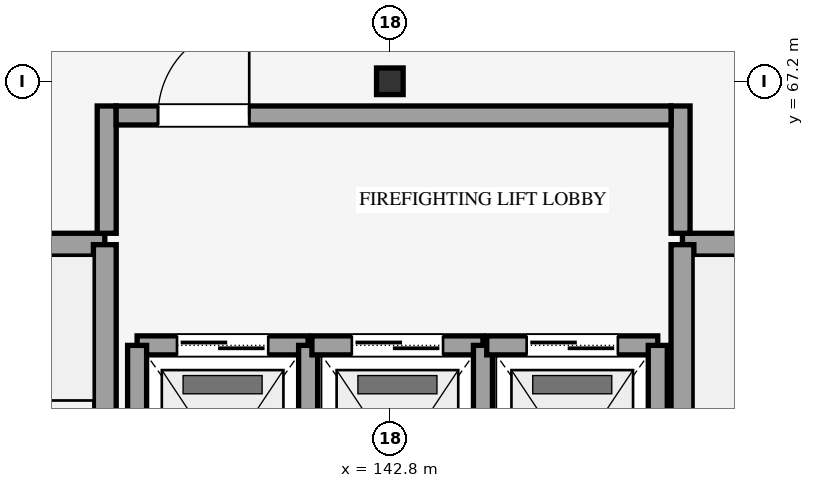
"""IFC4 building model, lengths in metres.
Left out: names, types, materials, properties, quantities, classifications, styles, units other than length and angle.
Written with IfcOpenShell. Run it as: python <this file> out.ifc"""

import sys

from ifc_helpers import new_model, si_unit, direction, frame, frame_2d, origin, origin_2d, place, context, subcontext, project, spatial, rectangle, i_section, extrude, element, fill, save


model = new_model("IFC4")
c1 = context("Model", 3, precision=1e-05, world=origin(), true_north=direction((0.0, 1.0)))
c2 = subcontext(c1, "Body", "Model", "MODEL_VIEW")
j1 = project(units=[si_unit("LENGTHUNIT", "METRE"), si_unit("PLANEANGLEUNIT", "RADIAN")], contexts=[c1])
p1 = place(None, origin())
s1 = spatial("IfcSite", under=j1, at=p1, CompositionType="ELEMENT")
p2 = place(p1, origin())
s2 = spatial("IfcBuilding", under=s1, at=p2, CompositionType="ELEMENT")
p3 = place(p2, frame((0.0, 0.0, 53.1)))
s3 = spatial("IfcBuildingStorey", under=s2, at=p3, CompositionType="ELEMENT", Elevation=53.1)
p4 = place(p3, frame((142.8, 67.2, 0.0), z_axis=(0.0, 0.0, 1.0), x_axis=(1.0, 0.0, 0.0)))
e1 = element("IfcColumn", 1, at=p4, inside=s3, PredefinedType="COLUMN", context=c2, shape_type="SweptSolid", body=[
    extrude(i_section(OverallWidth=0.35, OverallDepth=0.35, WebThickness=0.012, FlangeThickness=0.019, FilletRadius=0.02, at=origin_2d()), origin(), (0.0, 0.0, 1.0), 4.2),
])
p5 = place(p3, frame((135.05, 65.05, 0.0), z_axis=(0.0, 0.0, 1.0), x_axis=(1.0, 0.0, 0.0)))
e2 = element("IfcWall", 2, at=p5, inside=s3, PredefinedType="SHEAR", context=c2, shape_type="SweptSolid", body=[
    extrude(rectangle(XDim=4.0, YDim=0.3, at=frame_2d((2.0, 0.0))), origin(), (0.0, 0.0, 1.0), 4.2),
])
p6 = place(p3, frame((139.05, 50.75, 0.0), z_axis=(0.0, 0.0, 1.0), x_axis=(0.0, 1.0, 0.0)))
e3 = element("IfcWall", 3, at=p6, inside=s3, PredefinedType="SHEAR", context=c2, shape_type="SweptSolid", body=[
    extrude(rectangle(XDim=14.3, YDim=0.3, at=frame_2d((7.15, 0.0))), origin(), (0.0, 0.0, 1.0), 4.2),
])
p7 = place(p3, frame((146.65, 65.05, 0.0), z_axis=(0.0, 0.0, 1.0), x_axis=(1.0, 0.0, 0.0)))
e4 = element("IfcWall", 4, at=p7, inside=s3, PredefinedType="SHEAR", context=c2, shape_type="SweptSolid", body=[
    extrude(rectangle(XDim=4.0, YDim=0.3, at=frame_2d((2.0, 0.0))), origin(), (0.0, 0.0, 1.0), 4.2),
])
p8 = place(p3, frame((146.65, 50.75, 0.0), z_axis=(0.0, 0.0, 1.0), x_axis=(0.0, 1.0, 0.0)))
e5 = element("IfcWall", 5, at=p8, inside=s3, PredefinedType="SHEAR", context=c2, shape_type="SweptSolid", body=[
    extrude(rectangle(XDim=14.3, YDim=0.3, at=frame_2d((7.15, 0.0))), origin(), (0.0, 0.0, 1.0), 4.2),
])
p9 = place(p3, frame((139.475, 63.725, 0.0), z_axis=(0.0, 0.0, 1.0), x_axis=(1.0, 0.0, 0.0)))
e6 = element("IfcWall", 6, at=p9, inside=s3, PredefinedType="SHEAR", context=c2, shape_type="SweptSolid", body=[
    extrude(rectangle(XDim=2.25, YDim=0.25, at=frame_2d((1.125, 0.0))), origin(), (0.0, 0.0, 1.0), 3.96),
])
p10 = place(p9, frame((0.525, 0.0, 0.0)))
e7 = element("IfcOpeningElement", 7, at=p10, cuts=e6, PredefinedType="OPENING", context=c2, shape_type="SweptSolid", body=[
    extrude(rectangle(XDim=1.2, YDim=2.18, at=frame_2d((0.6, 1.09))), frame((0.0, 0.135, 0.0), z_axis=(0.0, -1.0, 0.0), x_axis=(1.0, 0.0, 0.0)), (0.0, 0.0, 1.0), 0.27),
])
for number, where, z_axis, x_axis in (
    (8, (139.475, 60.675, 0.0), (0.0, 0.0, 1.0), (0.0, 1.0, 0.0)),
    (9, (141.725, 60.675, 0.0), (0.0, 0.0, 1.0), (0.0, 1.0, 0.0)),
):
    element("IfcWall", number, at=place(p3, frame(where, z_axis=z_axis, x_axis=x_axis)), inside=s3, PredefinedType="SHEAR", context=c2, shape_type="SweptSolid", body=[
        extrude(rectangle(XDim=3.05, YDim=0.25, at=frame_2d((1.525, 0.0))), origin(), (0.0, 0.0, 1.0), 3.96),
    ])
p11 = place(p3, frame((141.775, 63.725, 0.0), z_axis=(0.0, 0.0, 1.0), x_axis=(1.0, 0.0, 0.0)))
e10 = element("IfcWall", 10, at=p11, inside=s3, PredefinedType="SHEAR", context=c2, shape_type="SweptSolid", body=[
    extrude(rectangle(XDim=2.25, YDim=0.25, at=frame_2d((1.125, 0.0))), origin(), (0.0, 0.0, 1.0), 3.96),
])
p12 = place(p11, frame((0.525, 0.0, 0.0)))
e11 = element("IfcOpeningElement", 11, at=p12, cuts=e10, PredefinedType="OPENING", context=c2, shape_type="SweptSolid", body=[
    extrude(rectangle(XDim=1.2, YDim=2.18, at=frame_2d((0.6, 1.09))), frame((0.0, 0.135, 0.0), z_axis=(0.0, -1.0, 0.0), x_axis=(1.0, 0.0, 0.0)), (0.0, 0.0, 1.0), 0.27),
])
p13 = place(p3, frame((144.025, 60.675, 0.0), z_axis=(0.0, 0.0, 1.0), x_axis=(0.0, 1.0, 0.0)))
e12 = element("IfcWall", 12, at=p13, inside=s3, PredefinedType="SHEAR", context=c2, shape_type="SweptSolid", body=[
    extrude(rectangle(XDim=3.05, YDim=0.25, at=frame_2d((1.525, 0.0))), origin(), (0.0, 0.0, 1.0), 3.96),
])
p14 = place(p3, frame((144.075, 63.725, 0.0), z_axis=(0.0, 0.0, 1.0), x_axis=(1.0, 0.0, 0.0)))
e13 = element("IfcWall", 13, at=p14, inside=s3, PredefinedType="SHEAR", context=c2, shape_type="SweptSolid", body=[
    extrude(rectangle(XDim=2.25, YDim=0.25, at=frame_2d((1.125, 0.0))), origin(), (0.0, 0.0, 1.0), 3.96),
])
p15 = place(p14, frame((0.525, 0.0, 0.0)))
e14 = element("IfcOpeningElement", 14, at=p15, cuts=e13, PredefinedType="OPENING", context=c2, shape_type="SweptSolid", body=[
    extrude(rectangle(XDim=1.2, YDim=2.18, at=frame_2d((0.6, 1.09))), frame((0.0, 0.135, 0.0), z_axis=(0.0, -1.0, 0.0), x_axis=(1.0, 0.0, 0.0)), (0.0, 0.0, 1.0), 0.27),
])
p16 = place(p3, frame((146.325, 60.675, 0.0), z_axis=(0.0, 0.0, 1.0), x_axis=(0.0, 1.0, 0.0)))
e15 = element("IfcWall", 15, at=p16, inside=s3, PredefinedType="SHEAR", context=c2, shape_type="SweptSolid", body=[
    extrude(rectangle(XDim=3.05, YDim=0.25, at=frame_2d((1.525, 0.0))), origin(), (0.0, 0.0, 1.0), 3.96),
])
for number, where, z_axis, x_axis in (
    (16, (139.075, 65.2, 0.0), (0.0, 0.0, 1.0), (0.0, 1.0, 0.0)),
    (17, (146.625, 65.2, 0.0), (0.0, 0.0, 1.0), (0.0, 1.0, 0.0)),
):
    element("IfcWall", number, at=place(p3, frame(where, z_axis=z_axis, x_axis=x_axis)), inside=s3, PredefinedType="SHEAR", context=c2, shape_type="SweptSolid", body=[
        extrude(rectangle(XDim=1.675, YDim=0.25, at=frame_2d((0.837, 0.0))), origin(), (0.0, 0.0, 1.0), 3.96),
    ])
p17 = place(p3, frame((139.2, 66.75, 0.0), z_axis=(0.0, 0.0, 1.0), x_axis=(1.0, 0.0, 0.0)))
e18 = element("IfcWall", 18, at=p17, inside=s3, PredefinedType="SHEAR", context=c2, shape_type="SweptSolid", body=[
    extrude(rectangle(XDim=7.3, YDim=0.25, at=frame_2d((3.65, 0.0))), origin(), (0.0, 0.0, 1.0), 3.96),
])
p18 = place(p17, frame((0.55, 0.0, 0.0)))
e19 = element("IfcOpeningElement", 19, at=p18, cuts=e18, PredefinedType="OPENING", context=c2, shape_type="SweptSolid", body=[
    extrude(rectangle(XDim=1.2, YDim=2.15, at=frame_2d((0.6, 1.075))), frame((0.0, 0.135, 0.0), z_axis=(0.0, -1.0, 0.0), x_axis=(1.0, 0.0, 0.0)), (0.0, 0.0, 1.0), 0.27),
])
p19 = place(p10, origin())
e20 = element("IfcDoor", 20, at=p19, inside=s3, OperationType="DOUBLE_DOOR_SLIDING", PredefinedType="DOOR", context=c2, shape_type="SweptSolid", body=[
    extrude(rectangle(XDim=1.2, YDim=2.18, at=frame_2d((0.6, 1.09))), frame((0.0, 0.025, 0.0), z_axis=(0.0, -1.0, 0.0), x_axis=(1.0, 0.0, 0.0)), (0.0, 0.0, 1.0), 0.05),
])
fill(e7, e20)
p20 = place(p12, origin())
e21 = element("IfcDoor", 21, at=p20, inside=s3, OperationType="DOUBLE_DOOR_SLIDING", PredefinedType="DOOR", context=c2, shape_type="SweptSolid", body=[
    extrude(rectangle(XDim=1.2, YDim=2.18, at=frame_2d((0.6, 1.09))), frame((0.0, 0.025, 0.0), z_axis=(0.0, -1.0, 0.0), x_axis=(1.0, 0.0, 0.0)), (0.0, 0.0, 1.0), 0.05),
])
fill(e11, e21)
p21 = place(p15, origin())
e22 = element("IfcDoor", 22, at=p21, inside=s3, OperationType="DOUBLE_DOOR_SLIDING", PredefinedType="DOOR", context=c2, shape_type="SweptSolid", body=[
    extrude(rectangle(XDim=1.2, YDim=2.18, at=frame_2d((0.6, 1.09))), frame((0.0, 0.025, 0.0), z_axis=(0.0, -1.0, 0.0), x_axis=(1.0, 0.0, 0.0)), (0.0, 0.0, 1.0), 0.05),
])
fill(e14, e22)
p22 = place(p18, origin())
e23 = element("IfcDoor", 23, at=p22, inside=s3, OperationType="SINGLE_SWING_RIGHT", PredefinedType="DOOR", context=c2, shape_type="SweptSolid", body=[
    extrude(rectangle(XDim=1.2, YDim=2.15, at=frame_2d((0.6, 1.075))), frame((0.0, 0.025, 0.0), z_axis=(0.0, -1.0, 0.0), x_axis=(1.0, 0.0, 0.0)), (0.0, 0.0, 1.0), 0.05),
])
fill(e19, e23)
save(model, sys.argv[1])
